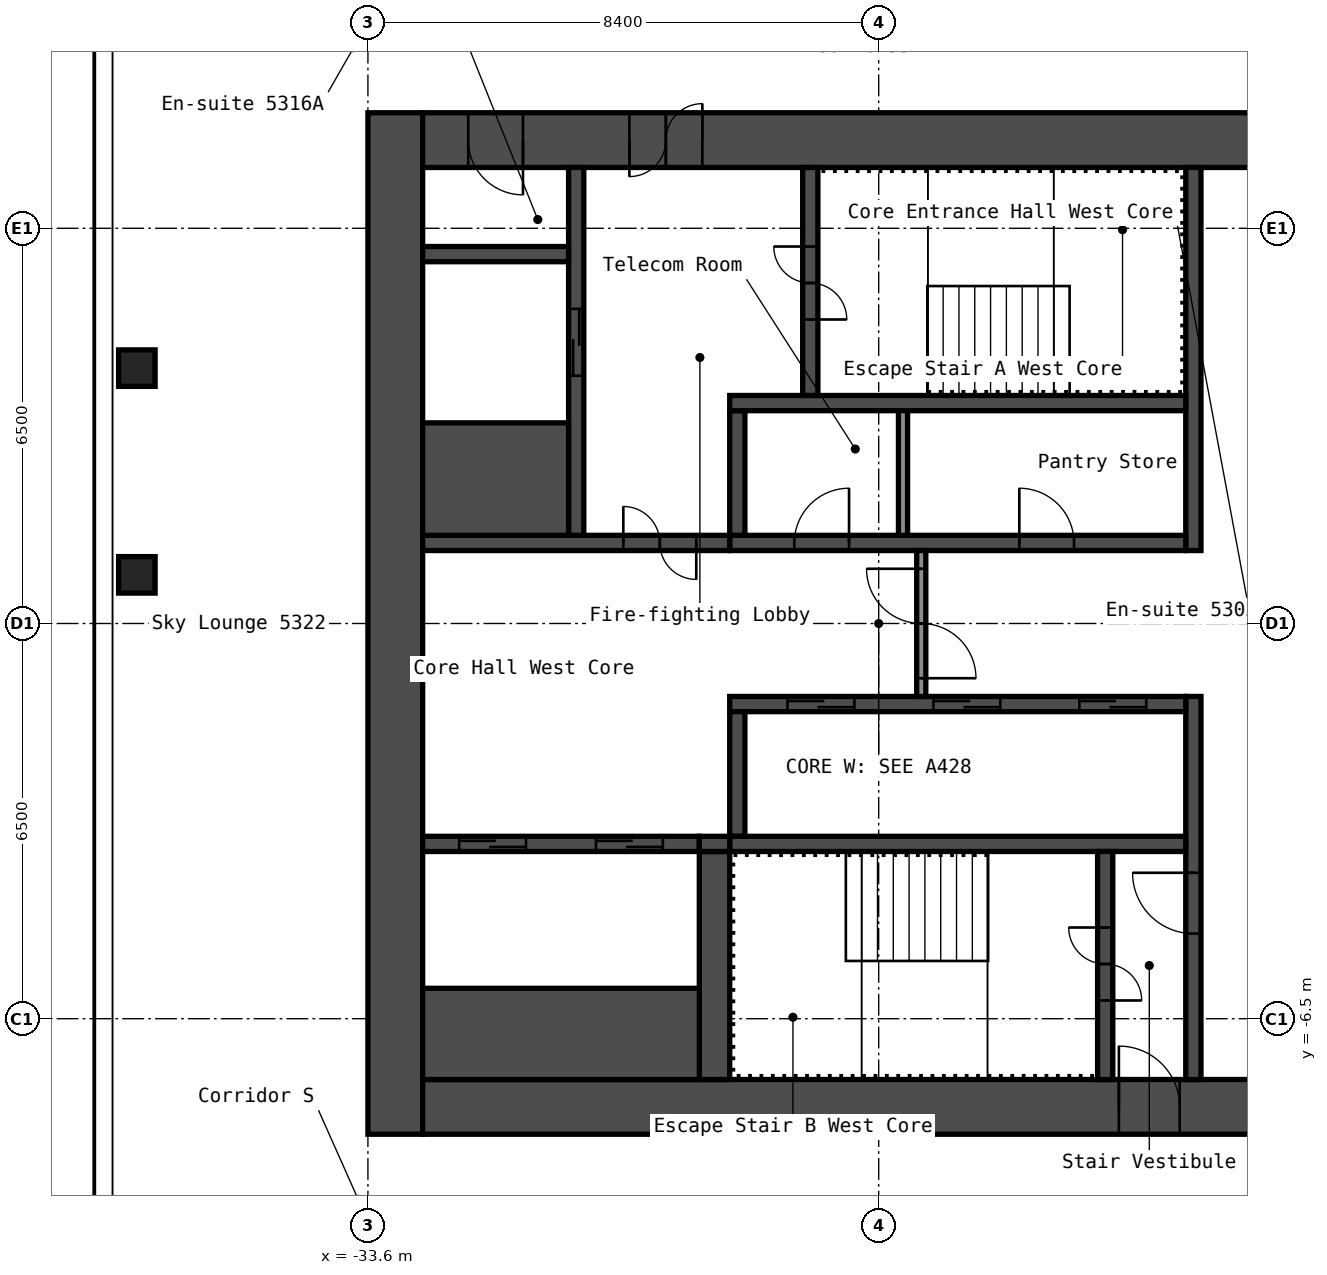
"""IFC4 building model, lengths in metres.
Left out: names, types, materials, properties, quantities, classifications, styles, units other than length and angle.
Written with IfcOpenShell. Run it as: python <this file> out.ifc"""

import sys

from ifc_helpers import new_model, si_unit, direction, frame, frame_2d, origin, origin_2d, place, context, subcontext, project, spatial, rectangle, hollow_rectangle, extrude, element, fill, save


model = new_model("IFC4")
c1 = context("Model", 3, precision=1e-05, world=origin(), true_north=direction((0.0, 1.0)))
c2 = subcontext(c1, "Body", "Model", "MODEL_VIEW")
j1 = project(units=[si_unit("LENGTHUNIT", "METRE"), si_unit("PLANEANGLEUNIT", "RADIAN")], contexts=[c1])
p1 = place(None, origin())
s1 = spatial("IfcSite", under=j1, at=p1, CompositionType="ELEMENT")
p2 = place(p1, origin())
s2 = spatial("IfcBuilding", under=s1, at=p2, CompositionType="ELEMENT")
p3 = place(p2, frame((0.0, 0.0, 189.8)))
s3 = spatial("IfcBuildingStorey", under=s2, at=p3, CompositionType="ELEMENT", Elevation=189.8)
for number, where, z_axis, x_axis in (
    (1, (-37.4, 0.8, 0.0), (0.0, 0.0, 1.0), (1.0, 0.0, 0.0)),
    (2, (-37.4, 4.2, 0.0), (0.0, 0.0, 1.0), (1.0, 0.0, 0.0)),
):
    element("IfcColumn", number, at=place(p3, frame(where, z_axis=z_axis, x_axis=x_axis)), inside=s3, PredefinedType="COLUMN", context=c2, shape_type="SweptSolid", body=[
        extrude(hollow_rectangle(XDim=0.6, YDim=0.6, WallThickness=0.025, InnerFilletRadius=0.038, OuterFilletRadius=0.062, at=origin_2d()), origin(), (0.0, 0.0, 1.0), 2.75),
    ])
p4 = place(p3, frame((-33.15, -8.4, 0.0), z_axis=(0.0, 0.0, 1.0), x_axis=(0.0, 1.0, 0.0)))
e3 = element("IfcWall", 3, at=p4, inside=s3, PredefinedType="SHEAR", context=c2, shape_type="SweptSolid", body=[
    extrude(rectangle(XDim=16.8, YDim=0.9, at=frame_2d((8.4, 0.0))), origin(), (0.0, 0.0, 1.0), 2.75),
])
p5 = place(p3, frame((-32.7, 7.95, 0.0), z_axis=(0.0, 0.0, 1.0), x_axis=(1.0, 0.0, 0.0)))
e4 = element("IfcWall", 4, at=p5, inside=s3, PredefinedType="SHEAR", context=c2, shape_type="SweptSolid", body=[
    extrude(rectangle(XDim=15.0, YDim=0.9, at=frame_2d((7.5, 0.0))), origin(), (0.0, 0.0, 1.0), 2.75),
])
p6 = place(p5, frame((3.4, 0.0, 0.0)))
e5 = element("IfcOpeningElement", 5, at=p6, cuts=e4, PredefinedType="OPENING", context=c2, shape_type="SweptSolid", body=[
    extrude(rectangle(XDim=1.2, YDim=2.1, at=frame_2d((0.6, 1.05))), frame((0.0, 0.46, 0.0), z_axis=(0.0, -1.0, 0.0), x_axis=(1.0, 0.0, 0.0)), (0.0, 0.0, 1.0), 0.92),
])
p7 = place(p5, frame((0.75, 0.0, 0.0)))
e6 = element("IfcOpeningElement", 6, at=p7, cuts=e4, PredefinedType="OPENING", context=c2, shape_type="SweptSolid", body=[
    extrude(rectangle(XDim=0.9, YDim=2.1, at=frame_2d((0.45, 1.05))), frame((0.0, 0.46, 0.0), z_axis=(0.0, -1.0, 0.0), x_axis=(1.0, 0.0, 0.0)), (0.0, 0.0, 1.0), 0.92),
])
p8 = place(p3, frame((-32.7, -7.95, 0.0), z_axis=(0.0, 0.0, 1.0), x_axis=(1.0, 0.0, 0.0)))
e7 = element("IfcWall", 7, at=p8, inside=s3, PredefinedType="SHEAR", context=c2, shape_type="SweptSolid", body=[
    extrude(rectangle(XDim=15.0, YDim=0.9, at=frame_2d((7.5, 0.0))), origin(), (0.0, 0.0, 1.0), 2.75),
])
p9 = place(p8, frame((11.45, 0.0, 0.0)))
e8 = element("IfcOpeningElement", 8, at=p9, cuts=e7, PredefinedType="OPENING", context=c2, shape_type="SweptSolid", body=[
    extrude(rectangle(XDim=1.0, YDim=2.1, at=frame_2d((0.5, 1.05))), frame((0.0, 0.46, 0.0), z_axis=(0.0, -1.0, 0.0), x_axis=(1.0, 0.0, 0.0)), (0.0, 0.0, 1.0), 0.92),
])
p10 = place(p3, frame((-20.025, 1.2, 0.0), z_axis=(0.0, 0.0, 1.0), x_axis=(0.0, 1.0, 0.0)))
e9 = element("IfcWall", 9, at=p10, inside=s3, PredefinedType="SHEAR", context=c2, shape_type="SweptSolid", body=[
    extrude(rectangle(XDim=6.3, YDim=0.25, at=frame_2d((3.15, 0.0))), origin(), (0.0, 0.0, 1.0), 2.75),
])
p11 = place(p3, frame((-20.025, -7.5, 0.0), z_axis=(0.0, 0.0, 1.0), x_axis=(0.0, 1.0, 0.0)))
e10 = element("IfcWall", 10, at=p11, inside=s3, PredefinedType="SHEAR", context=c2, shape_type="SweptSolid", body=[
    extrude(rectangle(XDim=6.3, YDim=0.25, at=frame_2d((3.15, 0.0))), origin(), (0.0, 0.0, 1.0), 2.75),
])
p12 = place(p11, frame((2.4, 0.0, 0.0)))
e11 = element("IfcOpeningElement", 11, at=p12, cuts=e10, PredefinedType="OPENING", context=c2, shape_type="SweptSolid", body=[
    extrude(rectangle(XDim=1.0, YDim=2.1, at=frame_2d((0.5, 1.05))), frame((0.0, 0.135, 0.0), z_axis=(0.0, -1.0, 0.0), x_axis=(1.0, 0.0, 0.0)), (0.0, 0.0, 1.0), 0.27),
])
p13 = place(p3, frame((-27.65, 1.325, 0.0), z_axis=(0.0, 0.0, 1.0), x_axis=(1.0, 0.0, 0.0)))
e12 = element("IfcWall", 12, at=p13, inside=s3, PredefinedType="SHEAR", context=c2, shape_type="SweptSolid", body=[
    extrude(rectangle(XDim=7.5, YDim=0.25, at=frame_2d((3.75, 0.0))), origin(), (0.0, 0.0, 1.0), 2.75),
])
p14 = place(p13, frame((4.762, 0.0, 0.0)))
e13 = element("IfcOpeningElement", 13, at=p14, cuts=e12, PredefinedType="OPENING", context=c2, shape_type="SweptSolid", body=[
    extrude(rectangle(XDim=0.9, YDim=2.1, at=frame_2d((0.45, 1.05))), frame((0.0, 0.135, 0.0), z_axis=(0.0, -1.0, 0.0), x_axis=(1.0, 0.0, 0.0)), (0.0, 0.0, 1.0), 0.27),
])
p15 = place(p13, frame((1.062, 0.0, 0.0)))
e14 = element("IfcOpeningElement", 14, at=p15, cuts=e12, PredefinedType="OPENING", context=c2, shape_type="SweptSolid", body=[
    extrude(rectangle(XDim=0.9, YDim=2.1, at=frame_2d((0.45, 1.05))), frame((0.0, 0.135, 0.0), z_axis=(0.0, -1.0, 0.0), x_axis=(1.0, 0.0, 0.0)), (0.0, 0.0, 1.0), 0.27),
])
p16 = place(p3, frame((-27.525, 1.45, 0.0), z_axis=(0.0, 0.0, 1.0), x_axis=(0.0, 1.0, 0.0)))
e15 = element("IfcWall", 15, at=p16, inside=s3, PredefinedType="SHEAR", context=c2, shape_type="SweptSolid", body=[
    extrude(rectangle(XDim=2.05, YDim=0.25, at=frame_2d((1.025, 0.0))), origin(), (0.0, 0.0, 1.0), 2.75),
])
p17 = place(p3, frame((-27.65, 3.625, 0.0), z_axis=(0.0, 0.0, 1.0), x_axis=(1.0, 0.0, 0.0)))
e16 = element("IfcWall", 16, at=p17, inside=s3, PredefinedType="SHEAR", context=c2, shape_type="SweptSolid", body=[
    extrude(rectangle(XDim=7.5, YDim=0.25, at=frame_2d((3.75, 0.0))), origin(), (0.0, 0.0, 1.0), 2.75),
])
p18 = place(p3, frame((-26.325, 3.75, 0.0), z_axis=(0.0, 0.0, 1.0), x_axis=(0.0, 1.0, 0.0)))
e17 = element("IfcWall", 17, at=p18, inside=s3, PredefinedType="SHEAR", context=c2, shape_type="SweptSolid", body=[
    extrude(rectangle(XDim=3.75, YDim=0.25, at=frame_2d((1.875, 0.0))), origin(), (0.0, 0.0, 1.0), 2.75),
])
p19 = place(p18, frame((1.25, 0.0, 0.0)))
e18 = element("IfcOpeningElement", 18, at=p19, cuts=e17, PredefinedType="OPENING", context=c2, shape_type="SweptSolid", body=[
    extrude(rectangle(XDim=1.2, YDim=2.1, at=frame_2d((0.6, 1.05))), frame((0.0, 0.135, 0.0), z_axis=(0.0, -1.0, 0.0), x_axis=(1.0, 0.0, 0.0)), (0.0, 0.0, 1.0), 0.27),
])
p20 = place(p3, frame((-32.7, 1.325, 0.0), z_axis=(0.0, 0.0, 1.0), x_axis=(1.0, 0.0, 0.0)))
e19 = element("IfcWall", 19, at=p20, inside=s3, PredefinedType="SHEAR", context=c2, shape_type="SweptSolid", body=[
    extrude(rectangle(XDim=5.05, YDim=0.25, at=frame_2d((2.525, 0.0))), origin(), (0.0, 0.0, 1.0), 2.75),
])
p21 = place(p20, frame((3.3, 0.0, 0.0)))
e20 = element("IfcOpeningElement", 20, at=p21, cuts=e19, PredefinedType="OPENING", context=c2, shape_type="SweptSolid", body=[
    extrude(rectangle(XDim=1.2, YDim=2.1, at=frame_2d((0.6, 1.05))), frame((0.0, 0.135, 0.0), z_axis=(0.0, -1.0, 0.0), x_axis=(1.0, 0.0, 0.0)), (0.0, 0.0, 1.0), 0.27),
])
p22 = place(p3, frame((-30.175, 1.45, 0.0), z_axis=(0.0, 0.0, 1.0), x_axis=(0.0, 1.0, 0.0)))
e21 = element("IfcWall", 21, at=p22, inside=s3, PredefinedType="SHEAR", context=c2, shape_type="SweptSolid", body=[
    extrude(rectangle(XDim=6.05, YDim=0.25, at=frame_2d((3.025, 0.0))), origin(), (0.0, 0.0, 1.0), 2.75),
])
p23 = place(p22, frame((2.625, 0.0, 0.0)))
e22 = element("IfcOpeningElement", 22, at=p23, cuts=e21, PredefinedType="OPENING", context=c2, shape_type="SweptSolid", body=[
    extrude(rectangle(XDim=1.1, YDim=2.1, at=frame_2d((0.55, 1.05))), frame((0.0, 0.135, 0.0), z_axis=(0.0, -1.0, 0.0), x_axis=(1.0, 0.0, 0.0)), (0.0, 0.0, 1.0), 0.27),
])
p24 = place(p3, frame((-32.7, 2.375, 0.0), z_axis=(0.0, 0.0, 1.0), x_axis=(1.0, 0.0, 0.0)))
e23 = element("IfcWall", 23, at=p24, inside=s3, PredefinedType="SHEAR", context=c2, shape_type="SweptSolid", body=[
    extrude(rectangle(XDim=2.4, YDim=1.85, at=frame_2d((1.2, 0.0))), origin(), (0.0, 0.0, 1.0), 2.75),
])
p25 = place(p3, frame((-32.7, 6.075, 0.0), z_axis=(0.0, 0.0, 1.0), x_axis=(1.0, 0.0, 0.0)))
e24 = element("IfcWall", 24, at=p25, inside=s3, PredefinedType="SHEAR", context=c2, shape_type="SweptSolid", body=[
    extrude(rectangle(XDim=2.4, YDim=0.25, at=frame_2d((1.2, 0.0))), origin(), (0.0, 0.0, 1.0), 2.75),
])
p26 = place(p3, frame((-27.65, -1.325, 0.0), z_axis=(0.0, 0.0, 1.0), x_axis=(1.0, 0.0, 0.0)))
e25 = element("IfcWall", 25, at=p26, inside=s3, PredefinedType="SHEAR", context=c2, shape_type="SweptSolid", body=[
    extrude(rectangle(XDim=7.5, YDim=0.25, at=frame_2d((3.75, 0.0))), origin(), (0.0, 0.0, 1.0), 2.75),
])
p27 = place(p26, frame((5.75, 0.0, 0.0)))
e26 = element("IfcOpeningElement", 26, at=p27, cuts=e25, PredefinedType="OPENING", context=c2, shape_type="SweptSolid", body=[
    extrude(rectangle(XDim=1.1, YDim=2.1, at=frame_2d((0.55, 1.05))), frame((0.0, 0.135, 0.0), z_axis=(0.0, -1.0, 0.0), x_axis=(1.0, 0.0, 0.0)), (0.0, 0.0, 1.0), 0.27),
])
p28 = place(p26, frame((3.35, 0.0, 0.0)))
e27 = element("IfcOpeningElement", 27, at=p28, cuts=e25, PredefinedType="OPENING", context=c2, shape_type="SweptSolid", body=[
    extrude(rectangle(XDim=1.1, YDim=2.1, at=frame_2d((0.55, 1.05))), frame((0.0, 0.135, 0.0), z_axis=(0.0, -1.0, 0.0), x_axis=(1.0, 0.0, 0.0)), (0.0, 0.0, 1.0), 0.27),
])
p29 = place(p26, frame((0.95, 0.0, 0.0)))
e28 = element("IfcOpeningElement", 28, at=p29, cuts=e25, PredefinedType="OPENING", context=c2, shape_type="SweptSolid", body=[
    extrude(rectangle(XDim=1.1, YDim=2.1, at=frame_2d((0.55, 1.05))), frame((0.0, 0.135, 0.0), z_axis=(0.0, -1.0, 0.0), x_axis=(1.0, 0.0, 0.0)), (0.0, 0.0, 1.0), 0.27),
])
p30 = place(p3, frame((-27.525, -3.5, 0.0), z_axis=(0.0, 0.0, 1.0), x_axis=(0.0, 1.0, 0.0)))
e29 = element("IfcWall", 29, at=p30, inside=s3, PredefinedType="SHEAR", context=c2, shape_type="SweptSolid", body=[
    extrude(rectangle(XDim=2.05, YDim=0.25, at=frame_2d((1.025, 0.0))), origin(), (0.0, 0.0, 1.0), 2.75),
])
p31 = place(p3, frame((-27.65, -3.625, 0.0), z_axis=(0.0, 0.0, 1.0), x_axis=(1.0, 0.0, 0.0)))
e30 = element("IfcWall", 30, at=p31, inside=s3, PredefinedType="SHEAR", context=c2, shape_type="SweptSolid", body=[
    extrude(rectangle(XDim=7.5, YDim=0.25, at=frame_2d((3.75, 0.0))), origin(), (0.0, 0.0, 1.0), 2.75),
])
p32 = place(p3, frame((-21.475, -7.5, 0.0), z_axis=(0.0, 0.0, 1.0), x_axis=(0.0, 1.0, 0.0)))
e31 = element("IfcWall", 31, at=p32, inside=s3, PredefinedType="SHEAR", context=c2, shape_type="SweptSolid", body=[
    extrude(rectangle(XDim=3.75, YDim=0.25, at=frame_2d((1.875, 0.0))), origin(), (0.0, 0.0, 1.0), 2.75),
])
p33 = place(p32, frame((1.3, 0.0, 0.0)))
e32 = element("IfcOpeningElement", 32, at=p33, cuts=e31, PredefinedType="OPENING", context=c2, shape_type="SweptSolid", body=[
    extrude(rectangle(XDim=1.2, YDim=2.1, at=frame_2d((0.6, 1.05))), frame((0.0, 0.135, 0.0), z_axis=(0.0, -1.0, 0.0), x_axis=(1.0, 0.0, 0.0)), (0.0, 0.0, 1.0), 0.27),
])
p34 = place(p3, frame((-27.9, -7.5, 0.0), z_axis=(0.0, 0.0, 1.0), x_axis=(0.0, 1.0, 0.0)))
e33 = element("IfcWall", 33, at=p34, inside=s3, PredefinedType="SHEAR", context=c2, shape_type="SweptSolid", body=[
    extrude(rectangle(XDim=3.75, YDim=0.5, at=frame_2d((1.875, 0.0))), origin(), (0.0, 0.0, 1.0), 2.75),
])
p35 = place(p3, frame((-32.7, -3.625, 0.0), z_axis=(0.0, 0.0, 1.0), x_axis=(1.0, 0.0, 0.0)))
e34 = element("IfcWall", 34, at=p35, inside=s3, PredefinedType="SHEAR", context=c2, shape_type="SweptSolid", body=[
    extrude(rectangle(XDim=4.55, YDim=0.25, at=frame_2d((2.275, 0.0))), origin(), (0.0, 0.0, 1.0), 2.75),
])
p36 = place(p35, frame((2.85, 0.0, 0.0)))
e35 = element("IfcOpeningElement", 35, at=p36, cuts=e34, PredefinedType="OPENING", context=c2, shape_type="SweptSolid", body=[
    extrude(rectangle(XDim=1.1, YDim=2.1, at=frame_2d((0.55, 1.05))), frame((0.0, 0.135, 0.0), z_axis=(0.0, -1.0, 0.0), x_axis=(1.0, 0.0, 0.0)), (0.0, 0.0, 1.0), 0.27),
])
p37 = place(p35, frame((0.6, 0.0, 0.0)))
e36 = element("IfcOpeningElement", 36, at=p37, cuts=e34, PredefinedType="OPENING", context=c2, shape_type="SweptSolid", body=[
    extrude(rectangle(XDim=1.1, YDim=2.1, at=frame_2d((0.55, 1.05))), frame((0.0, 0.135, 0.0), z_axis=(0.0, -1.0, 0.0), x_axis=(1.0, 0.0, 0.0)), (0.0, 0.0, 1.0), 0.27),
])
p38 = place(p3, frame((-32.7, -6.75, 0.0), z_axis=(0.0, 0.0, 1.0), x_axis=(1.0, 0.0, 0.0)))
e37 = element("IfcWall", 37, at=p38, inside=s3, PredefinedType="SHEAR", context=c2, shape_type="SweptSolid", body=[
    extrude(rectangle(XDim=4.55, YDim=1.5, at=frame_2d((2.275, 0.0))), origin(), (0.0, 0.0, 1.0), 2.75),
])
p39 = place(p3, frame((-28.15, -3.625, 0.0), z_axis=(0.0, 0.0, 1.0), x_axis=(1.0, 0.0, 0.0)))
e38 = element("IfcWall", 38, at=p39, inside=s3, PredefinedType="SHEAR", context=c2, shape_type="SweptSolid", body=[
    extrude(rectangle(XDim=0.5, YDim=0.25, at=frame_2d((0.25, 0.0))), origin(), (0.0, 0.0, 1.0), 2.75),
])
p40 = place(p3, frame((-24.5, -1.2, 0.0), z_axis=(0.0, 0.0, 1.0), x_axis=(0.0, 1.0, 0.0)))
e39 = element("IfcWall", 39, at=p40, inside=s3, PredefinedType="PARTITIONING", context=c2, shape_type="SweptSolid", body=[
    extrude(rectangle(XDim=2.4, YDim=0.15, at=frame_2d((1.2, 0.0))), origin(), (0.0, 0.0, 1.0), 2.75),
])
p41 = place(p40, frame((0.3, 0.0, 0.0)))
e40 = element("IfcOpeningElement", 40, at=p41, cuts=e39, PredefinedType="OPENING", context=c2, shape_type="SweptSolid", body=[
    extrude(rectangle(XDim=1.8, YDim=2.1, at=frame_2d((0.9, 1.05))), frame((0.0, 0.085, 0.0), z_axis=(0.0, -1.0, 0.0), x_axis=(1.0, 0.0, 0.0)), (0.0, 0.0, 1.0), 0.17),
])
p42 = place(p3, frame((-24.8, 1.45, 0.0), z_axis=(0.0, 0.0, 1.0), x_axis=(0.0, 1.0, 0.0)))
e41 = element("IfcWall", 41, at=p42, inside=s3, PredefinedType="PARTITIONING", context=c2, shape_type="SweptSolid", body=[
    extrude(rectangle(XDim=2.05, YDim=0.15, at=frame_2d((1.025, 0.0))), origin(), (0.0, 0.0, 1.0), 2.75),
])
p43 = place(p6, origin())
e42 = element("IfcDoor", 42, at=p43, inside=s3, OperationType="DOUBLE_DOOR_SINGLE_SWING", PredefinedType="DOOR", context=c2, shape_type="SweptSolid", body=[
    extrude(rectangle(XDim=1.2, YDim=2.1, at=frame_2d((0.6, 1.05))), frame((0.0, 0.025, 0.0), z_axis=(0.0, -1.0, 0.0), x_axis=(1.0, 0.0, 0.0)), (0.0, 0.0, 1.0), 0.05),
])
fill(e5, e42)
p44 = place(p7, origin())
e43 = element("IfcDoor", 43, at=p44, inside=s3, OperationType="SINGLE_SWING_RIGHT", PredefinedType="DOOR", context=c2, shape_type="SweptSolid", body=[
    extrude(rectangle(XDim=0.9, YDim=2.1, at=frame_2d((0.45, 1.05))), frame((0.0, 0.025, 0.0), z_axis=(0.0, -1.0, 0.0), x_axis=(1.0, 0.0, 0.0)), (0.0, 0.0, 1.0), 0.05),
])
fill(e6, e43)
p45 = place(p9, origin())
e44 = element("IfcDoor", 44, at=p45, inside=s3, OperationType="SINGLE_SWING_RIGHT", PredefinedType="DOOR", context=c2, shape_type="SweptSolid", body=[
    extrude(rectangle(XDim=1.0, YDim=2.1, at=frame_2d((0.5, 1.05))), frame((0.0, 0.025, 0.0), z_axis=(0.0, -1.0, 0.0), x_axis=(1.0, 0.0, 0.0)), (0.0, 0.0, 1.0), 0.05),
])
fill(e8, e44)
p46 = place(p19, origin())
e45 = element("IfcDoor", 45, at=p46, inside=s3, OperationType="DOUBLE_DOOR_SINGLE_SWING", PredefinedType="DOOR", context=c2, shape_type="SweptSolid", body=[
    extrude(rectangle(XDim=1.2, YDim=2.1, at=frame_2d((0.6, 1.05))), frame((0.0, 0.025, 0.0), z_axis=(0.0, -1.0, 0.0), x_axis=(1.0, 0.0, 0.0)), (0.0, 0.0, 1.0), 0.05),
])
fill(e18, e45)
p47 = place(p33, origin())
e46 = element("IfcDoor", 46, at=p47, inside=s3, OperationType="DOUBLE_DOOR_SINGLE_SWING", PredefinedType="DOOR", context=c2, shape_type="SweptSolid", body=[
    extrude(rectangle(XDim=1.2, YDim=2.1, at=frame_2d((0.6, 1.05))), frame((0.0, 0.025, 0.0), z_axis=(0.0, -1.0, 0.0), x_axis=(1.0, 0.0, 0.0)), (0.0, 0.0, 1.0), 0.05),
])
fill(e32, e46)
p48 = place(p12, origin())
e47 = element("IfcDoor", 47, at=p48, inside=s3, OperationType="SINGLE_SWING_LEFT", PredefinedType="DOOR", context=c2, shape_type="SweptSolid", body=[
    extrude(rectangle(XDim=1.0, YDim=2.1, at=frame_2d((0.5, 1.05))), frame((0.0, 0.025, 0.0), z_axis=(0.0, -1.0, 0.0), x_axis=(1.0, 0.0, 0.0)), (0.0, 0.0, 1.0), 0.05),
])
fill(e11, e47)
p49 = place(p21, origin())
e48 = element("IfcDoor", 48, at=p49, inside=s3, OperationType="DOUBLE_DOOR_SINGLE_SWING", PredefinedType="DOOR", context=c2, shape_type="SweptSolid", body=[
    extrude(rectangle(XDim=1.2, YDim=2.1, at=frame_2d((0.6, 1.05))), frame((0.0, 0.025, 0.0), z_axis=(0.0, -1.0, 0.0), x_axis=(1.0, 0.0, 0.0)), (0.0, 0.0, 1.0), 0.05),
])
fill(e20, e48)
p50 = place(p41, origin())
e49 = element("IfcDoor", 49, at=p50, inside=s3, OperationType="DOUBLE_DOOR_SINGLE_SWING", PredefinedType="DOOR", context=c2, shape_type="SweptSolid", body=[
    extrude(rectangle(XDim=1.8, YDim=2.1, at=frame_2d((0.9, 1.05))), frame((0.0, 0.025, 0.0), z_axis=(0.0, -1.0, 0.0), x_axis=(1.0, 0.0, 0.0)), (0.0, 0.0, 1.0), 0.05),
])
fill(e40, e49)
p51 = place(p14, origin())
e50 = element("IfcDoor", 50, at=p51, inside=s3, OperationType="SINGLE_SWING_RIGHT", PredefinedType="DOOR", context=c2, shape_type="SweptSolid", body=[
    extrude(rectangle(XDim=0.9, YDim=2.1, at=frame_2d((0.45, 1.05))), frame((0.0, 0.025, 0.0), z_axis=(0.0, -1.0, 0.0), x_axis=(1.0, 0.0, 0.0)), (0.0, 0.0, 1.0), 0.05),
])
fill(e13, e50)
p52 = place(p15, origin())
e51 = element("IfcDoor", 51, at=p52, inside=s3, OperationType="SINGLE_SWING_LEFT", PredefinedType="DOOR", context=c2, shape_type="SweptSolid", body=[
    extrude(rectangle(XDim=0.9, YDim=2.1, at=frame_2d((0.45, 1.05))), frame((0.0, 0.025, 0.0), z_axis=(0.0, -1.0, 0.0), x_axis=(1.0, 0.0, 0.0)), (0.0, 0.0, 1.0), 0.05),
])
fill(e14, e51)
p53 = place(p27, origin())
e52 = element("IfcDoor", 52, at=p53, inside=s3, OperationType="DOUBLE_DOOR_SLIDING", PredefinedType="DOOR", context=c2, shape_type="SweptSolid", body=[
    extrude(rectangle(XDim=1.1, YDim=2.1, at=frame_2d((0.55, 1.05))), frame((0.0, 0.025, 0.0), z_axis=(0.0, -1.0, 0.0), x_axis=(1.0, 0.0, 0.0)), (0.0, 0.0, 1.0), 0.05),
])
fill(e26, e52)
p54 = place(p28, origin())
e53 = element("IfcDoor", 53, at=p54, inside=s3, OperationType="DOUBLE_DOOR_SLIDING", PredefinedType="DOOR", context=c2, shape_type="SweptSolid", body=[
    extrude(rectangle(XDim=1.1, YDim=2.1, at=frame_2d((0.55, 1.05))), frame((0.0, 0.025, 0.0), z_axis=(0.0, -1.0, 0.0), x_axis=(1.0, 0.0, 0.0)), (0.0, 0.0, 1.0), 0.05),
])
fill(e27, e53)
p55 = place(p29, origin())
e54 = element("IfcDoor", 54, at=p55, inside=s3, OperationType="DOUBLE_DOOR_SLIDING", PredefinedType="DOOR", context=c2, shape_type="SweptSolid", body=[
    extrude(rectangle(XDim=1.1, YDim=2.1, at=frame_2d((0.55, 1.05))), frame((0.0, 0.025, 0.0), z_axis=(0.0, -1.0, 0.0), x_axis=(1.0, 0.0, 0.0)), (0.0, 0.0, 1.0), 0.05),
])
fill(e28, e54)
p56 = place(p23, origin())
e55 = element("IfcDoor", 55, at=p56, inside=s3, OperationType="DOUBLE_DOOR_SLIDING", PredefinedType="DOOR", context=c2, shape_type="SweptSolid", body=[
    extrude(rectangle(XDim=1.1, YDim=2.1, at=frame_2d((0.55, 1.05))), frame((0.0, 0.025, 0.0), z_axis=(0.0, -1.0, 0.0), x_axis=(1.0, 0.0, 0.0)), (0.0, 0.0, 1.0), 0.05),
])
fill(e22, e55)
p57 = place(p36, origin())
e56 = element("IfcDoor", 56, at=p57, inside=s3, OperationType="DOUBLE_DOOR_SLIDING", PredefinedType="DOOR", context=c2, shape_type="SweptSolid", body=[
    extrude(rectangle(XDim=1.1, YDim=2.1, at=frame_2d((0.55, 1.05))), frame((0.0, 0.025, 0.0), z_axis=(0.0, -1.0, 0.0), x_axis=(1.0, 0.0, 0.0)), (0.0, 0.0, 1.0), 0.05),
])
fill(e35, e56)
p58 = place(p37, origin())
e57 = element("IfcDoor", 57, at=p58, inside=s3, OperationType="DOUBLE_DOOR_SLIDING", PredefinedType="DOOR", context=c2, shape_type="SweptSolid", body=[
    extrude(rectangle(XDim=1.1, YDim=2.1, at=frame_2d((0.55, 1.05))), frame((0.0, 0.025, 0.0), z_axis=(0.0, -1.0, 0.0), x_axis=(1.0, 0.0, 0.0)), (0.0, 0.0, 1.0), 0.05),
])
fill(e36, e57)
save(model, sys.argv[1])
